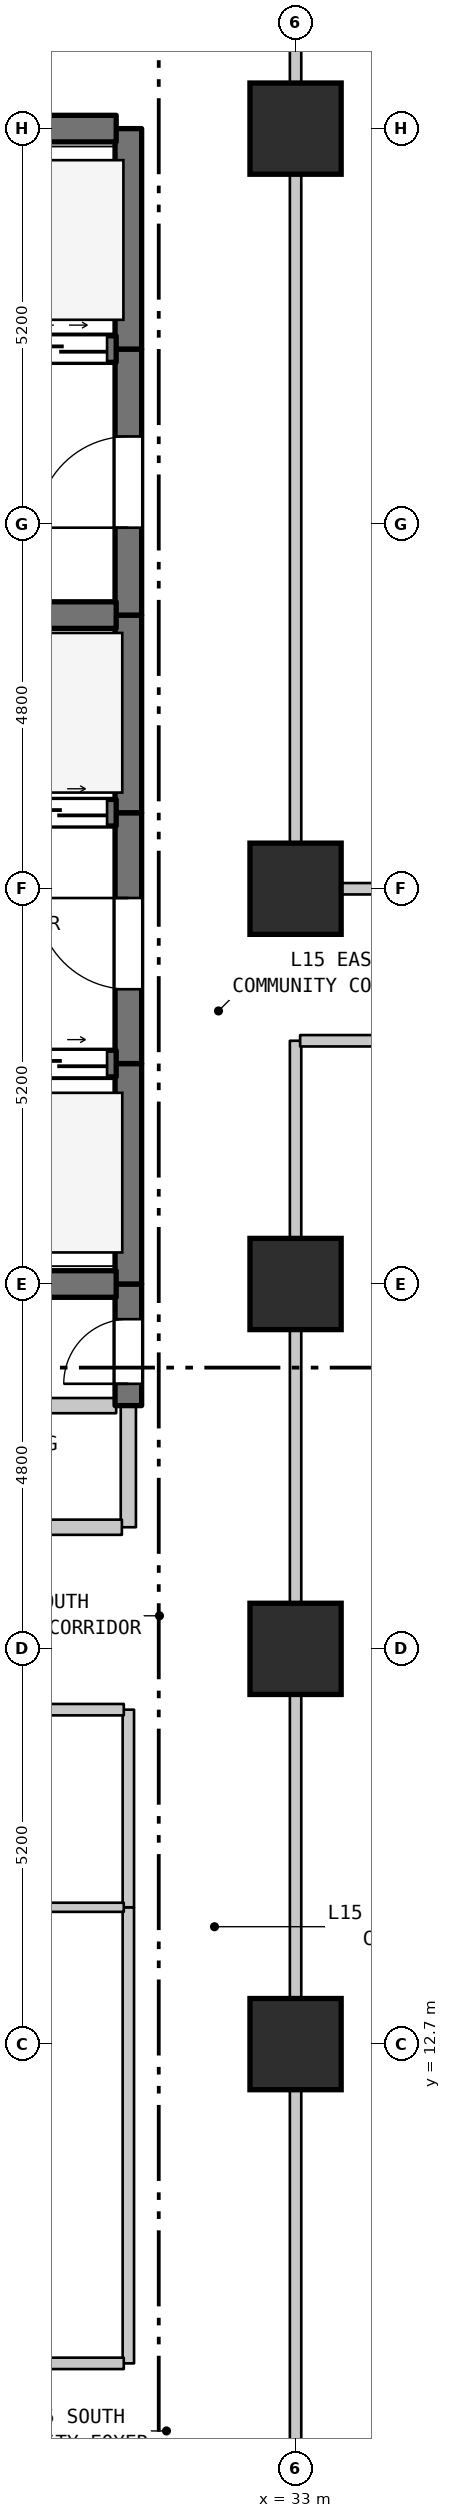
"""IFC4 building model, lengths in metres.
Left out: names, types, materials, properties, quantities, classifications, styles, units other than length and angle.
Written with IfcOpenShell. Run it as: python <this file> out.ifc"""

import sys

from ifc_helpers import new_model, si_unit, direction, frame, frame_2d, origin, origin_2d, place, context, subcontext, project, spatial, rectangle, extrude, element, fill, save


model = new_model("IFC4")
c1 = context("Model", 3, precision=1e-05, world=origin(), true_north=direction((0.0, 1.0)))
c2 = subcontext(c1, "Body", "Model", "MODEL_VIEW")
j1 = project(units=[si_unit("LENGTHUNIT", "METRE"), si_unit("PLANEANGLEUNIT", "RADIAN")], contexts=[c1])
p1 = place(None, origin())
s1 = spatial("IfcSite", under=j1, at=p1, CompositionType="ELEMENT")
p2 = place(p1, origin())
s2 = spatial("IfcBuilding", under=s1, at=p2, CompositionType="ELEMENT")
p3 = place(p2, frame((0.0, 0.0, 65.6)))
s3 = spatial("IfcBuildingStorey", under=s2, at=p3, CompositionType="ELEMENT", Elevation=65.6)
for number, where, z_axis, x_axis in (
    (1, (33.0, 12.7, 0.0), (0.0, 0.0, 1.0), (1.0, 0.0, 0.0)),
    (2, (33.0, 17.9, 0.0), (0.0, 0.0, 1.0), (1.0, 0.0, 0.0)),
    (3, (33.0, 22.7, 0.0), (0.0, 0.0, 1.0), (1.0, 0.0, 0.0)),
    (4, (33.0, 27.9, 0.0), (0.0, 0.0, 1.0), (1.0, 0.0, 0.0)),
    (5, (33.0, 37.9, 0.0), (0.0, 0.0, 1.0), (1.0, 0.0, 0.0)),
):
    element("IfcColumn", number, at=place(p3, frame(where, z_axis=z_axis, x_axis=x_axis)), inside=s3, PredefinedType="COLUMN", context=c2, shape_type="SweptSolid", body=[
        extrude(rectangle(XDim=1.2, YDim=1.2, at=origin_2d()), origin(), (0.0, 0.0, 1.0), 4.5),
    ])
p4 = place(p3, frame((30.8, 8.5, 0.0), z_axis=(0.0, 0.0, 1.0), x_axis=(0.0, 1.0, 0.0)))
e6 = element("IfcWall", 6, at=p4, inside=s3, PredefinedType="STANDARD", context=c2, shape_type="SweptSolid", body=[
    extrude(rectangle(XDim=6.0, YDim=0.15, at=frame_2d((3.0, 0.0))), origin(), (0.0, 0.0, 1.0), 4.185),
])
p5 = place(p3, frame((30.8, 14.5, 0.0), z_axis=(0.0, 0.0, 1.0), x_axis=(0.0, 1.0, 0.0)))
e7 = element("IfcWall", 7, at=p5, inside=s3, PredefinedType="STANDARD", context=c2, shape_type="SweptSolid", body=[
    extrude(rectangle(XDim=2.6, YDim=0.15, at=frame_2d((1.3, 0.0))), origin(), (0.0, 0.0, 1.0), 4.185),
])
p6 = place(p3, frame((30.8, 19.5, 0.0), z_axis=(0.0, 0.0, 1.0), x_axis=(0.0, 1.0, 0.0)))
e8 = element("IfcWall", 8, at=p6, inside=s3, PredefinedType="STANDARD", context=c2, shape_type="SweptSolid", body=[
    extrude(rectangle(XDim=1.6, YDim=0.2, at=frame_2d((0.8, 0.0))), origin(), (0.0, 0.0, 1.0), 4.185),
])
p7 = place(p3, frame((30.8, 21.1, 0.0), z_axis=(0.0, 0.0, 1.0), x_axis=(0.0, 1.0, 0.0)))
e9 = element("IfcWall", 9, at=p7, inside=s3, PredefinedType="SHEAR", context=c2, shape_type="SweptSolid", body=[
    extrude(rectangle(XDim=1.6, YDim=0.35, at=frame_2d((0.8, 0.0))), origin(), (0.0, 0.0, 1.0), 4.185),
])
p8 = place(p7, frame((0.287, 0.0, 0.0)))
e10 = element("IfcOpeningElement", 10, at=p8, cuts=e9, PredefinedType="OPENING", context=c2, shape_type="SweptSolid", body=[
    extrude(rectangle(XDim=0.85, YDim=2.1, at=frame_2d((0.425, 1.05))), frame((0.0, 0.185, 0.0), z_axis=(0.0, -1.0, 0.0), x_axis=(1.0, 0.0, 0.0)), (0.0, 0.0, 1.0), 0.37),
])
p9 = place(p3, frame((30.8, 22.7, 0.0), z_axis=(0.0, 0.0, 1.0), x_axis=(0.0, 1.0, 0.0)))
e11 = element("IfcWall", 11, at=p9, inside=s3, PredefinedType="SHEAR", context=c2, shape_type="SweptSolid", body=[
    extrude(rectangle(XDim=2.9, YDim=0.35, at=frame_2d((1.45, 0.0))), origin(), (0.0, 0.0, 1.0), 4.185),
])
p10 = place(p3, frame((30.8, 25.6, 0.0), z_axis=(0.0, 0.0, 1.0), x_axis=(0.0, 1.0, 0.0)))
e12 = element("IfcWall", 12, at=p10, inside=s3, PredefinedType="SHEAR", context=c2, shape_type="SweptSolid", body=[
    extrude(rectangle(XDim=3.3, YDim=0.35, at=frame_2d((1.65, 0.0))), origin(), (0.0, 0.0, 1.0), 4.185),
])
p11 = place(p10, frame((0.978, 0.0, 0.0)))
e13 = element("IfcOpeningElement", 13, at=p11, cuts=e12, PredefinedType="OPENING", context=c2, shape_type="SweptSolid", body=[
    extrude(rectangle(XDim=1.2, YDim=2.2, at=frame_2d((0.6, 1.1))), frame((0.0, 0.185, 0.0), z_axis=(0.0, -1.0, 0.0), x_axis=(1.0, 0.0, 0.0)), (0.0, 0.0, 1.0), 0.37),
])
p12 = place(p3, frame((30.8, 28.9, 0.0), z_axis=(0.0, 0.0, 1.0), x_axis=(0.0, 1.0, 0.0)))
e14 = element("IfcWall", 14, at=p12, inside=s3, PredefinedType="SHEAR", context=c2, shape_type="SweptSolid", body=[
    extrude(rectangle(XDim=2.6, YDim=0.35, at=frame_2d((1.3, 0.0))), origin(), (0.0, 0.0, 1.0), 4.185),
])
p13 = place(p3, frame((30.8, 31.5, 0.0), z_axis=(0.0, 0.0, 1.0), x_axis=(0.0, 1.0, 0.0)))
e15 = element("IfcWall", 15, at=p13, inside=s3, PredefinedType="SHEAR", context=c2, shape_type="SweptSolid", body=[
    extrude(rectangle(XDim=3.5, YDim=0.35, at=frame_2d((1.75, 0.0))), origin(), (0.0, 0.0, 1.0), 4.185),
])
p14 = place(p13, frame((1.15, 0.0, 0.0)))
e16 = element("IfcOpeningElement", 16, at=p14, cuts=e15, PredefinedType="OPENING", context=c2, shape_type="SweptSolid", body=[
    extrude(rectangle(XDim=1.2, YDim=2.2, at=frame_2d((0.6, 1.1))), frame((0.0, 0.185, 0.0), z_axis=(0.0, -1.0, 0.0), x_axis=(1.0, 0.0, 0.0)), (0.0, 0.0, 1.0), 0.37),
])
p15 = place(p3, frame((30.8, 35.0, 0.0), z_axis=(0.0, 0.0, 1.0), x_axis=(0.0, 1.0, 0.0)))
e17 = element("IfcWall", 17, at=p15, inside=s3, PredefinedType="SHEAR", context=c2, shape_type="SweptSolid", body=[
    extrude(rectangle(XDim=2.9, YDim=0.35, at=frame_2d((1.45, 0.0))), origin(), (0.0, 0.0, 1.0), 4.185),
])
p16 = place(p3, frame((33.0, 6.7, 0.0), z_axis=(0.0, 0.0, 1.0), x_axis=(0.0, 1.0, 0.0)))
e18 = element("IfcWall", 18, at=p16, inside=s3, PredefinedType="STANDARD", context=c2, shape_type="SweptSolid", body=[
    extrude(rectangle(XDim=19.2, YDim=0.15, at=frame_2d((9.6, 0.0))), origin(), (0.0, 0.0, 1.0), 3.685),
])
p17 = place(p3, frame((33.0, 27.9, 0.0), z_axis=(0.0, 0.0, 1.0), x_axis=(0.0, 1.0, 0.0)))
e19 = element("IfcWall", 19, at=p17, inside=s3, PredefinedType="STANDARD", context=c2, shape_type="SweptSolid", body=[
    extrude(rectangle(XDim=10.0, YDim=0.15, at=frame_2d((5.0, 0.0))), origin(), (0.0, 0.0, 1.0), 3.685),
])
p18 = place(p3, frame((25.245, 8.5, 0.0), z_axis=(0.0, 0.0, 1.0), x_axis=(1.0, 0.0, 0.0)))
e20 = element("IfcWall", 20, at=p18, inside=s3, PredefinedType="STANDARD", context=c2, shape_type="SweptSolid", body=[
    extrude(rectangle(XDim=5.495, YDim=0.15, at=frame_2d((2.748, 0.0))), origin(), (0.0, 0.0, 1.0), 4.185),
])
p19 = place(p18, frame((2.469, 0.0, 0.0)))
e21 = element("IfcOpeningElement", 21, at=p19, cuts=e20, PredefinedType="OPENING", context=c2, shape_type="SweptSolid", body=[
    extrude(rectangle(XDim=1.0, YDim=2.15, at=frame_2d((0.5, 1.075))), frame((0.0, 0.085, 0.0), z_axis=(0.0, -1.0, 0.0), x_axis=(1.0, 0.0, 0.0)), (0.0, 0.0, 1.0), 0.17),
])
p20 = place(p3, frame((27.045, 14.5, 0.0), z_axis=(0.0, 0.0, 1.0), x_axis=(1.0, 0.0, 0.0)))
e22 = element("IfcWall", 22, at=p20, inside=s3, PredefinedType="PARTITIONING", context=c2, shape_type="SweptSolid", body=[
    extrude(rectangle(XDim=3.695, YDim=0.12, at=frame_2d((1.848, 0.0))), origin(), (0.0, 0.0, 1.0), 4.185),
])
p21 = place(p3, frame((27.045, 17.1, 0.0), z_axis=(0.0, 0.0, 1.0), x_axis=(1.0, 0.0, 0.0)))
e23 = element("IfcWall", 23, at=p21, inside=s3, PredefinedType="STANDARD", context=c2, shape_type="SweptSolid", body=[
    extrude(rectangle(XDim=3.695, YDim=0.15, at=frame_2d((1.848, 0.0))), origin(), (0.0, 0.0, 1.0), 4.185),
])
p22 = place(p3, frame((27.285, 19.5, 0.0), z_axis=(0.0, 0.0, 1.0), x_axis=(1.0, 0.0, 0.0)))
e24 = element("IfcWall", 24, at=p22, inside=s3, PredefinedType="STANDARD", context=c2, shape_type="SweptSolid", body=[
    extrude(rectangle(XDim=3.43, YDim=0.2, at=frame_2d((1.715, 0.0))), origin(), (0.0, 0.0, 1.0), 4.185),
])
p23 = place(p22, frame((1.192, 0.0, 0.0)))
e25 = element("IfcOpeningElement", 25, at=p23, cuts=e24, PredefinedType="OPENING", context=c2, shape_type="SweptSolid", body=[
    extrude(rectangle(XDim=0.9, YDim=2.15, at=frame_2d((0.45, 1.075))), frame((0.0, 0.11, 0.0), z_axis=(0.0, -1.0, 0.0), x_axis=(1.0, 0.0, 0.0)), (0.0, 0.0, 1.0), 0.22),
])
p24 = place(p3, frame((27.285, 21.1, 0.0), z_axis=(0.0, 0.0, 1.0), x_axis=(1.0, 0.0, 0.0)))
e26 = element("IfcWall", 26, at=p24, inside=s3, PredefinedType="STANDARD", context=c2, shape_type="SweptSolid", body=[
    extrude(rectangle(XDim=3.355, YDim=0.2, at=frame_2d((1.677, 0.0))), origin(), (0.0, 0.0, 1.0), 4.185),
])
p25 = place(p3, frame((27.46, 22.7, 0.0), z_axis=(0.0, 0.0, 1.0), x_axis=(1.0, 0.0, 0.0)))
e27 = element("IfcWall", 27, at=p25, inside=s3, PredefinedType="SHEAR", context=c2, shape_type="SweptSolid", body=[
    extrude(rectangle(XDim=3.18, YDim=0.35, at=frame_2d((1.59, 0.0))), origin(), (0.0, 0.0, 1.0), 4.185),
])
p26 = place(p3, frame((27.46, 25.6, 0.0), z_axis=(0.0, 0.0, 1.0), x_axis=(1.0, 0.0, 0.0)))
e28 = element("IfcWall", 28, at=p26, inside=s3, PredefinedType="SHEAR", context=c2, shape_type="SweptSolid", body=[
    extrude(rectangle(XDim=3.18, YDim=0.35, at=frame_2d((1.59, 0.0))), origin(), (0.0, 0.0, 1.0), 4.185),
])
p27 = place(p26, frame((0.12, 0.0, 0.0)))
e29 = element("IfcOpeningElement", 29, at=p27, cuts=e28, PredefinedType="OPENING", context=c2, shape_type="SweptSolid", body=[
    extrude(rectangle(XDim=1.25, YDim=2.2, at=frame_2d((0.625, 1.1))), frame((0.0, 0.185, 0.0), z_axis=(0.0, -1.0, 0.0), x_axis=(1.0, 0.0, 0.0)), (0.0, 0.0, 1.0), 0.37),
])
p28 = place(p26, frame((1.81, 0.0, 0.0)))
e30 = element("IfcOpeningElement", 30, at=p28, cuts=e28, PredefinedType="OPENING", context=c2, shape_type="SweptSolid", body=[
    extrude(rectangle(XDim=1.25, YDim=2.2, at=frame_2d((0.625, 1.1))), frame((0.0, 0.185, 0.0), z_axis=(0.0, -1.0, 0.0), x_axis=(1.0, 0.0, 0.0)), (0.0, 0.0, 1.0), 0.37),
])
p29 = place(p3, frame((33.06, 25.9, 0.0), z_axis=(0.0, 0.0, 1.0), x_axis=(1.0, 0.0, 0.0)))
e31 = element("IfcWall", 31, at=p29, inside=s3, PredefinedType="STANDARD", context=c2, shape_type="SweptSolid", body=[
    extrude(rectangle(XDim=17.895, YDim=0.15, at=frame_2d((8.948, 0.0))), origin(), (0.0, 0.0, 1.0), 4.185),
])
p30 = place(p29, frame((8.369, 0.0, 0.0)))
e32 = element("IfcOpeningElement", 32, at=p30, cuts=e31, PredefinedType="OPENING", context=c2, shape_type="SweptSolid", body=[
    extrude(rectangle(XDim=1.0, YDim=2.15, at=frame_2d((0.5, 1.075))), frame((0.0, 0.085, 0.0), z_axis=(0.0, -1.0, 0.0), x_axis=(1.0, 0.0, 0.0)), (0.0, 0.0, 1.0), 0.17),
])
p31 = place(p3, frame((33.06, 27.9, 0.0), z_axis=(0.0, 0.0, 1.0), x_axis=(1.0, 0.0, 0.0)))
e33 = element("IfcWall", 33, at=p31, inside=s3, PredefinedType="STANDARD", context=c2, shape_type="SweptSolid", body=[
    extrude(rectangle(XDim=23.94, YDim=0.15, at=frame_2d((11.97, 0.0))), origin(), (0.0, 0.0, 1.0), 3.685),
])
p32 = place(p31, frame((8.77, 0.0, 0.0)))
e34 = element("IfcOpeningElement", 34, at=p32, cuts=e33, PredefinedType="OPENING", context=c2, shape_type="SweptSolid", body=[
    extrude(rectangle(XDim=1.2, YDim=2.2, at=frame_2d((0.6, 1.1))), frame((0.0, 0.085, 0.0), z_axis=(0.0, -1.0, 0.0), x_axis=(1.0, 0.0, 0.0)), (0.0, 0.0, 1.0), 0.17),
])
p33 = place(p3, frame((27.46, 28.9, 0.0), z_axis=(0.0, 0.0, 1.0), x_axis=(1.0, 0.0, 0.0)))
e35 = element("IfcWall", 35, at=p33, inside=s3, PredefinedType="SHEAR", context=c2, shape_type="SweptSolid", body=[
    extrude(rectangle(XDim=3.18, YDim=0.35, at=frame_2d((1.59, 0.0))), origin(), (0.0, 0.0, 1.0), 4.185),
])
p34 = place(p33, frame((0.12, 0.0, 0.0)))
e36 = element("IfcOpeningElement", 36, at=p34, cuts=e35, PredefinedType="OPENING", context=c2, shape_type="SweptSolid", body=[
    extrude(rectangle(XDim=1.25, YDim=2.2, at=frame_2d((0.625, 1.1))), frame((0.0, 0.185, 0.0), z_axis=(0.0, -1.0, 0.0), x_axis=(1.0, 0.0, 0.0)), (0.0, 0.0, 1.0), 0.37),
])
p35 = place(p33, frame((1.81, 0.0, 0.0)))
e37 = element("IfcOpeningElement", 37, at=p35, cuts=e35, PredefinedType="OPENING", context=c2, shape_type="SweptSolid", body=[
    extrude(rectangle(XDim=1.25, YDim=2.2, at=frame_2d((0.625, 1.1))), frame((0.0, 0.185, 0.0), z_axis=(0.0, -1.0, 0.0), x_axis=(1.0, 0.0, 0.0)), (0.0, 0.0, 1.0), 0.37),
])
p36 = place(p3, frame((27.46, 31.5, 0.0), z_axis=(0.0, 0.0, 1.0), x_axis=(1.0, 0.0, 0.0)))
e38 = element("IfcWall", 38, at=p36, inside=s3, PredefinedType="SHEAR", context=c2, shape_type="SweptSolid", body=[
    extrude(rectangle(XDim=3.18, YDim=0.35, at=frame_2d((1.59, 0.0))), origin(), (0.0, 0.0, 1.0), 4.185),
])
p37 = place(p3, frame((19.16, 35.0, 0.0), z_axis=(0.0, 0.0, 1.0), x_axis=(1.0, 0.0, 0.0)))
e39 = element("IfcWall", 39, at=p37, inside=s3, PredefinedType="SHEAR", context=c2, shape_type="SweptSolid", body=[
    extrude(rectangle(XDim=11.48, YDim=0.35, at=frame_2d((5.74, 0.0))), origin(), (0.0, 0.0, 1.0), 4.185),
])
p38 = place(p37, frame((0.365, 0.0, 0.0)))
e40 = element("IfcOpeningElement", 40, at=p38, cuts=e39, PredefinedType="OPENING", context=c2, shape_type="SweptSolid", body=[
    extrude(rectangle(XDim=1.35, YDim=2.2, at=frame_2d((0.675, 1.1))), frame((0.0, 0.185, 0.0), z_axis=(0.0, -1.0, 0.0), x_axis=(1.0, 0.0, 0.0)), (0.0, 0.0, 1.0), 0.37),
])
p39 = place(p37, frame((2.765, 0.0, 0.0)))
e41 = element("IfcOpeningElement", 41, at=p39, cuts=e39, PredefinedType="OPENING", context=c2, shape_type="SweptSolid", body=[
    extrude(rectangle(XDim=1.35, YDim=2.2, at=frame_2d((0.675, 1.1))), frame((0.0, 0.185, 0.0), z_axis=(0.0, -1.0, 0.0), x_axis=(1.0, 0.0, 0.0)), (0.0, 0.0, 1.0), 0.37),
])
p40 = place(p37, frame((4.915, 0.0, 0.0)))
e42 = element("IfcOpeningElement", 42, at=p40, cuts=e39, PredefinedType="OPENING", context=c2, shape_type="SweptSolid", body=[
    extrude(rectangle(XDim=1.2, YDim=2.2, at=frame_2d((0.6, 1.1))), frame((0.0, 0.185, 0.0), z_axis=(0.0, -1.0, 0.0), x_axis=(1.0, 0.0, 0.0)), (0.0, 0.0, 1.0), 0.37),
])
p41 = place(p37, frame((6.665, 0.0, 0.0)))
e43 = element("IfcOpeningElement", 43, at=p41, cuts=e39, PredefinedType="OPENING", context=c2, shape_type="SweptSolid", body=[
    extrude(rectangle(XDim=1.2, YDim=2.2, at=frame_2d((0.6, 1.1))), frame((0.0, 0.185, 0.0), z_axis=(0.0, -1.0, 0.0), x_axis=(1.0, 0.0, 0.0)), (0.0, 0.0, 1.0), 0.37),
])
p42 = place(p37, frame((8.415, 0.0, 0.0)))
e44 = element("IfcOpeningElement", 44, at=p42, cuts=e39, PredefinedType="OPENING", context=c2, shape_type="SweptSolid", body=[
    extrude(rectangle(XDim=1.2, YDim=2.2, at=frame_2d((0.6, 1.1))), frame((0.0, 0.185, 0.0), z_axis=(0.0, -1.0, 0.0), x_axis=(1.0, 0.0, 0.0)), (0.0, 0.0, 1.0), 0.37),
])
p43 = place(p37, frame((10.16, 0.0, 0.0)))
e45 = element("IfcOpeningElement", 45, at=p43, cuts=e39, PredefinedType="OPENING", context=c2, shape_type="SweptSolid", body=[
    extrude(rectangle(XDim=1.2, YDim=2.2, at=frame_2d((0.6, 1.1))), frame((0.0, 0.185, 0.0), z_axis=(0.0, -1.0, 0.0), x_axis=(1.0, 0.0, 0.0)), (0.0, 0.0, 1.0), 0.37),
])
p44 = place(p3, frame((19.16, 37.9, 0.0), z_axis=(0.0, 0.0, 1.0), x_axis=(1.0, 0.0, 0.0)))
e46 = element("IfcWall", 46, at=p44, inside=s3, PredefinedType="SHEAR", context=c2, shape_type="SweptSolid", body=[
    extrude(rectangle(XDim=11.48, YDim=0.35, at=frame_2d((5.74, 0.0))), origin(), (0.0, 0.0, 1.0), 4.185),
])
p45 = place(p3, frame((33.0, 37.9, 0.0), z_axis=(0.0, 0.0, 1.0), x_axis=(0.0, 1.0, 0.0)))
e47 = element("IfcWall", 47, at=p45, inside=s3, PredefinedType="STANDARD", context=c2, shape_type="SweptSolid", body=[
    extrude(rectangle(XDim=2.4, YDim=0.15, at=frame_2d((1.2, 0.0))), origin(), (0.0, 0.0, 1.0), 3.585),
])
p46 = place(p8, origin())
e48 = element("IfcDoor", 48, at=p46, inside=s3, OperationType="SINGLE_SWING_LEFT", PredefinedType="DOOR", context=c2, shape_type="SweptSolid", body=[
    extrude(rectangle(XDim=0.85, YDim=2.1, at=frame_2d((0.425, 1.05))), frame((0.0, 0.025, 0.0), z_axis=(0.0, -1.0, 0.0), x_axis=(1.0, 0.0, 0.0)), (0.0, 0.0, 1.0), 0.05),
])
fill(e10, e48)
p47 = place(p11, origin())
e49 = element("IfcDoor", 49, at=p47, inside=s3, OperationType="SINGLE_SWING_RIGHT", PredefinedType="DOOR", context=c2, shape_type="SweptSolid", body=[
    extrude(rectangle(XDim=1.2, YDim=2.2, at=frame_2d((0.6, 1.1))), frame((0.0, 0.025, 0.0), z_axis=(0.0, -1.0, 0.0), x_axis=(1.0, 0.0, 0.0)), (0.0, 0.0, 1.0), 0.05),
])
fill(e13, e49)
p48 = place(p14, origin())
e50 = element("IfcDoor", 50, at=p48, inside=s3, OperationType="SINGLE_SWING_LEFT", PredefinedType="DOOR", context=c2, shape_type="SweptSolid", body=[
    extrude(rectangle(XDim=1.2, YDim=2.2, at=frame_2d((0.6, 1.1))), frame((0.0, 0.025, 0.0), z_axis=(0.0, -1.0, 0.0), x_axis=(1.0, 0.0, 0.0)), (0.0, 0.0, 1.0), 0.05),
])
fill(e16, e50)
p49 = place(p28, origin())
e51 = element("IfcDoor", 51, at=p49, inside=s3, OperationType="DOUBLE_DOOR_SLIDING", PredefinedType="DOOR", context=c2, shape_type="SweptSolid", body=[
    extrude(rectangle(XDim=1.25, YDim=2.2, at=frame_2d((0.625, 1.1))), frame((0.0, 0.025, 0.0), z_axis=(0.0, -1.0, 0.0), x_axis=(1.0, 0.0, 0.0)), (0.0, 0.0, 1.0), 0.05),
])
fill(e30, e51)
p50 = place(p35, origin())
e52 = element("IfcDoor", 52, at=p50, inside=s3, OperationType="DOUBLE_DOOR_SLIDING", PredefinedType="DOOR", context=c2, shape_type="SweptSolid", body=[
    extrude(rectangle(XDim=1.25, YDim=2.2, at=frame_2d((0.625, 1.1))), frame((0.0, 0.025, 0.0), z_axis=(0.0, -1.0, 0.0), x_axis=(1.0, 0.0, 0.0)), (0.0, 0.0, 1.0), 0.05),
])
fill(e37, e52)
p51 = place(p43, origin())
e53 = element("IfcDoor", 53, at=p51, inside=s3, OperationType="DOUBLE_DOOR_SLIDING", PredefinedType="DOOR", context=c2, shape_type="SweptSolid", body=[
    extrude(rectangle(XDim=1.2, YDim=2.2, at=frame_2d((0.6, 1.1))), frame((0.0, 0.025, 0.0), z_axis=(0.0, -1.0, 0.0), x_axis=(1.0, 0.0, 0.0)), (0.0, 0.0, 1.0), 0.05),
])
fill(e45, e53)
save(model, sys.argv[1])
